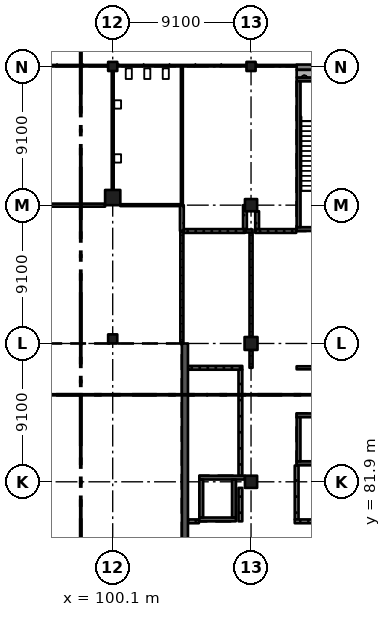
"""IFC4 building model, lengths in metres.
Left out: names, types, materials, properties, quantities, classifications, styles, units other than length and angle.
Written with IfcOpenShell. Run it as: python <this file> out.ifc"""

import sys

from ifc_helpers import new_model, si_unit, direction, frame, frame_2d, origin, origin_2d, place, context, subcontext, project, spatial, rectangle, extrude, element, fill, save


model = new_model("IFC4")
c1 = context("Model", 3, precision=1e-05, world=origin(), true_north=direction((0.0, 1.0)))
c2 = subcontext(c1, "Body", "Model", "MODEL_VIEW")
j1 = project(units=[si_unit("LENGTHUNIT", "METRE"), si_unit("PLANEANGLEUNIT", "RADIAN")], contexts=[c1])
p1 = place(None, origin())
s1 = spatial("IfcSite", under=j1, at=p1, CompositionType="ELEMENT")
p2 = place(p1, origin())
s2 = spatial("IfcBuilding", under=s1, at=p2, CompositionType="ELEMENT")
p3 = place(p2, frame((0.0, 0.0, 6.37)))
s3 = spatial("IfcBuildingStorey", under=s2, at=p3, CompositionType="ELEMENT", Elevation=6.37)
p4 = place(p3, frame((100.1, 91.3, 0.0), z_axis=(0.0, 0.0, 1.0), x_axis=(1.0, 0.0, 0.0)))
e1 = element("IfcColumn", 1, at=p4, inside=s3, PredefinedType="COLUMN", context=c2, shape_type="SweptSolid", body=[
    extrude(rectangle(XDim=0.6, YDim=0.6, at=origin_2d()), origin(), (0.0, 0.0, 1.0), 4.55),
])
p5 = place(p3, frame((100.1, 100.6, 0.0), z_axis=(0.0, 0.0, 1.0), x_axis=(1.0, 0.0, 0.0)))
e2 = element("IfcColumn", 2, at=p5, inside=s3, PredefinedType="COLUMN", context=c2, shape_type="SweptSolid", body=[
    extrude(rectangle(XDim=1.0, YDim=1.0, at=origin_2d()), origin(), (0.0, 0.0, 1.0), 4.55),
])
p6 = place(p3, frame((100.1, 109.225, 0.0), z_axis=(0.0, 0.0, 1.0), x_axis=(1.0, 0.0, 0.0)))
e3 = element("IfcColumn", 3, at=p6, inside=s3, PredefinedType="COLUMN", context=c2, shape_type="SweptSolid", body=[
    extrude(rectangle(XDim=0.6, YDim=0.6, at=origin_2d()), origin(), (0.0, 0.0, 1.0), 4.55),
])
p7 = place(p3, frame((109.2, 81.9, 0.0), z_axis=(0.0, 0.0, 1.0), x_axis=(1.0, 0.0, 0.0)))
e4 = element("IfcColumn", 4, at=p7, inside=s3, PredefinedType="COLUMN", context=c2, shape_type="SweptSolid", body=[
    extrude(rectangle(XDim=0.8, YDim=0.8, at=origin_2d()), origin(), (0.0, 0.0, 1.0), 4.55),
])
p8 = place(p3, frame((109.2, 91.0, 0.0), z_axis=(0.0, 0.0, 1.0), x_axis=(1.0, 0.0, 0.0)))
e5 = element("IfcColumn", 5, at=p8, inside=s3, PredefinedType="COLUMN", context=c2, shape_type="SweptSolid", body=[
    extrude(rectangle(XDim=0.85, YDim=0.85, at=origin_2d()), origin(), (0.0, 0.0, 1.0), 4.55),
])
p9 = place(p3, frame((109.2, 100.1, 0.0), z_axis=(0.0, 0.0, 1.0), x_axis=(1.0, 0.0, 0.0)))
e6 = element("IfcColumn", 6, at=p9, inside=s3, PredefinedType="COLUMN", context=c2, shape_type="SweptSolid", body=[
    extrude(rectangle(XDim=0.8, YDim=0.8, at=origin_2d()), origin(), (0.0, 0.0, 1.0), 4.55),
])
p10 = place(p3, frame((109.2, 109.225, 0.0), z_axis=(0.0, 0.0, 1.0), x_axis=(1.0, 0.0, 0.0)))
e7 = element("IfcColumn", 7, at=p10, inside=s3, PredefinedType="COLUMN", context=c2, shape_type="SweptSolid", body=[
    extrude(rectangle(XDim=0.6, YDim=0.6, at=origin_2d()), origin(), (0.0, 0.0, 1.0), 4.55),
])
p11 = place(p3, frame((104.85, 68.25, 0.0), z_axis=(0.0, 0.0, 1.0), x_axis=(0.0, 1.0, 0.0)))
e8 = element("IfcWall", 8, at=p11, inside=s3, PredefinedType="SHEAR", context=c2, shape_type="SweptSolid", body=[
    extrude(rectangle(XDim=22.75, YDim=0.4, at=frame_2d((11.375, 0.0))), origin(), (0.0, 0.0, 1.0), 4.55),
])
p12 = place(p3, frame((114.8, 83.125, 0.0), z_axis=(0.0, 0.0, 1.0), x_axis=(-1.0, 0.0, 0.0)))
e9 = element("IfcWall", 9, at=p12, inside=s3, PredefinedType="SHEAR", context=c2, shape_type="SweptSolid", body=[
    extrude(rectangle(XDim=2.6, YDim=0.25, at=frame_2d((1.3, 0.0))), origin(), (0.0, 0.0, 1.0), 4.55),
])
p13 = place(p3, frame((114.8, 86.275, 0.0), z_axis=(0.0, 0.0, 1.0), x_axis=(-1.0, 0.0, 0.0)))
e10 = element("IfcWall", 10, at=p13, inside=s3, PredefinedType="SHEAR", context=c2, shape_type="SweptSolid", body=[
    extrude(rectangle(XDim=2.6, YDim=0.25, at=frame_2d((1.3, 0.0))), origin(), (0.0, 0.0, 1.0), 4.55),
])
p14 = place(p13, frame((0.8, 0.0, 0.0)))
e11 = element("IfcOpeningElement", 11, at=p14, cuts=e10, PredefinedType="OPENING", context=c2, shape_type="SweptSolid", body=[
    extrude(rectangle(XDim=1.0, YDim=2.1, at=frame_2d((0.5, 1.05))), frame((0.0, 0.135, 0.0), z_axis=(0.0, -1.0, 0.0), x_axis=(1.0, 0.0, 0.0)), (0.0, 0.0, 1.0), 0.27),
])
p15 = place(p3, frame((112.325, 86.15, 0.0), z_axis=(0.0, 0.0, 1.0), x_axis=(0.0, -1.0, 0.0)))
e12 = element("IfcWall", 12, at=p15, inside=s3, PredefinedType="SHEAR", context=c2, shape_type="SweptSolid", body=[
    extrude(rectangle(XDim=2.9, YDim=0.25, at=frame_2d((1.45, 0.0))), origin(), (0.0, 0.0, 1.0), 4.55),
])
p16 = place(p3, frame((108.2, 79.425, 0.0), z_axis=(0.0, 0.0, 1.0), x_axis=(-1.0, 0.0, 0.0)))
e13 = element("IfcWall", 13, at=p16, inside=s3, PredefinedType="SHEAR", context=c2, shape_type="SweptSolid", body=[
    extrude(rectangle(XDim=2.4, YDim=0.25, at=frame_2d((1.2, 0.0))), origin(), (0.0, 0.0, 1.0), 4.55),
])
p17 = place(p16, frame((0.75, 0.0, 0.0)))
e14 = element("IfcOpeningElement", 14, at=p17, cuts=e13, PredefinedType="OPENING", context=c2, shape_type="SweptSolid", body=[
    extrude(rectangle(XDim=0.9, YDim=2.1, at=frame_2d((0.45, 1.05))), frame((0.0, 0.135, 0.0), z_axis=(0.0, -1.0, 0.0), x_axis=(1.0, 0.0, 0.0)), (0.0, 0.0, 1.0), 0.27),
])
p18 = place(p3, frame((108.8, 82.175, 0.0), z_axis=(0.0, 0.0, 1.0), x_axis=(-1.0, 0.0, 0.0)))
e15 = element("IfcWall", 15, at=p18, inside=s3, PredefinedType="SHEAR", context=c2, shape_type="SweptSolid", body=[
    extrude(rectangle(XDim=3.0, YDim=0.25, at=frame_2d((1.5, 0.0))), origin(), (0.0, 0.0, 1.0), 4.55),
])
for number, where, z_axis, x_axis in (
    (16, (105.925, 82.05, 0.0), (0.0, 0.0, 1.0), (0.0, -1.0, 0.0)),
    (17, (108.075, 82.05, 0.0), (0.0, 0.0, 1.0), (0.0, -1.0, 0.0)),
):
    element("IfcWall", number, at=place(p3, frame(where, z_axis=z_axis, x_axis=x_axis)), inside=s3, PredefinedType="SHEAR", context=c2, shape_type="SweptSolid", body=[
        extrude(rectangle(XDim=2.5, YDim=0.25, at=frame_2d((1.25, 0.0))), origin(), (0.0, 0.0, 1.0), 4.55),
    ])
p19 = place(p3, frame((117.6, 98.525, 0.0), z_axis=(0.0, 0.0, 1.0), x_axis=(-1.0, 0.0, 0.0)))
e18 = element("IfcWall", 18, at=p19, inside=s3, PredefinedType="SHEAR", context=c2, shape_type="SweptSolid", body=[
    extrude(rectangle(XDim=5.4, YDim=0.25, at=frame_2d((2.7, 0.0))), origin(), (0.0, 0.0, 1.0), 4.55),
])
p20 = place(p19, frame((1.5, 0.0, 0.0)))
e19 = element("IfcOpeningElement", 19, at=p20, cuts=e18, PredefinedType="OPENING", context=c2, shape_type="SweptSolid", body=[
    extrude(rectangle(XDim=2.4, YDim=2.1, at=frame_2d((1.2, 1.05))), frame((0.0, 0.135, 0.0), z_axis=(0.0, -1.0, 0.0), x_axis=(1.0, 0.0, 0.0)), (0.0, 0.0, 1.0), 0.27),
])
p21 = place(p3, frame((117.6, 108.375, 0.0), z_axis=(0.0, 0.0, 1.0), x_axis=(-1.0, 0.0, 0.0)))
e20 = element("IfcWall", 20, at=p21, inside=s3, PredefinedType="SHEAR", context=c2, shape_type="SweptSolid", body=[
    extrude(rectangle(XDim=5.4, YDim=0.25, at=frame_2d((2.7, 0.0))), origin(), (0.0, 0.0, 1.0), 4.55),
])
p22 = place(p3, frame((112.325, 108.25, 0.0), z_axis=(0.0, 0.0, 1.0), x_axis=(0.0, -1.0, 0.0)))
e21 = element("IfcWall", 21, at=p22, inside=s3, PredefinedType="SHEAR", context=c2, shape_type="SweptSolid", body=[
    extrude(rectangle(XDim=9.6, YDim=0.25, at=frame_2d((4.8, 0.0))), origin(), (0.0, 0.0, 1.0), 4.55),
])
p23 = place(p3, frame((118.025, 109.175, 0.0), z_axis=(0.0, 0.0, 1.0), x_axis=(-1.0, 0.0, 0.0)))
e22 = element("IfcWall", 22, at=p23, inside=s3, PredefinedType="SOLIDWALL", context=c2, shape_type="SweptSolid", body=[
    extrude(rectangle(XDim=5.825, YDim=0.35, at=frame_2d((2.913, 0.0))), origin(), (0.0, 0.0, 1.0), 3.5),
])
p24 = place(p3, frame((112.2, 108.75, 0.0), z_axis=(0.0, 0.0, 1.0), x_axis=(1.0, 0.0, 0.0)))
e23 = element("IfcWall", 23, at=p24, inside=s3, PredefinedType="SOLIDWALL", context=c2, shape_type="SweptSolid", body=[
    extrude(rectangle(XDim=5.4, YDim=0.5, at=frame_2d((2.7, 0.0))), origin(), (0.0, 0.0, 1.0), 4.55),
])
p25 = place(p3, frame((91.5, 100.1, 0.0), z_axis=(0.0, 0.0, 1.0), x_axis=(1.0, 0.0, 0.0)))
e24 = element("IfcWall", 24, at=p25, inside=s3, PredefinedType="PARTITIONING", context=c2, shape_type="SweptSolid", body=[
    extrude(rectangle(XDim=8.1, YDim=0.2, at=frame_2d((4.05, 0.0))), origin(), (0.0, 0.0, 1.0), 3.55),
])
p26 = place(p25, frame((3.15, 0.0, 0.0)))
e25 = element("IfcOpeningElement", 25, at=p26, cuts=e24, PredefinedType="OPENING", context=c2, shape_type="SweptSolid", body=[
    extrude(rectangle(XDim=1.8, YDim=2.1, at=frame_2d((0.9, 1.05))), frame((0.0, 0.11, 0.0), z_axis=(0.0, -1.0, 0.0), x_axis=(1.0, 0.0, 0.0)), (0.0, 0.0, 1.0), 0.22),
])
p27 = place(p3, frame((100.1, 108.925, 0.0), z_axis=(0.0, 0.0, 1.0), x_axis=(0.0, -1.0, 0.0)))
e26 = element("IfcWall", 26, at=p27, inside=s3, PredefinedType="PARTITIONING", context=c2, shape_type="SweptSolid", body=[
    extrude(rectangle(XDim=7.825, YDim=0.125, at=frame_2d((3.913, 0.0))), origin(), (0.0, 0.0, 1.0), 3.55),
])
p28 = place(p3, frame((100.6, 100.1, 0.0), z_axis=(0.0, 0.0, 1.0), x_axis=(1.0, 0.0, 0.0)))
e27 = element("IfcWall", 27, at=p28, inside=s3, PredefinedType="PARTITIONING", context=c2, shape_type="SweptSolid", body=[
    extrude(rectangle(XDim=3.925, YDim=0.125, at=frame_2d((1.962, 0.0))), origin(), (0.0, 0.0, 1.0), 3.55),
])
p29 = place(p28, frame((1.55, 0.0, 0.0)))
e28 = element("IfcOpeningElement", 28, at=p29, cuts=e27, PredefinedType="OPENING", context=c2, shape_type="SweptSolid", body=[
    extrude(rectangle(XDim=0.9, YDim=2.1, at=frame_2d((0.45, 1.05))), frame((0.0, 0.073, 0.0), z_axis=(0.0, -1.0, 0.0), x_axis=(1.0, 0.0, 0.0)), (0.0, 0.0, 1.0), 0.145),
])
p30 = place(p3, frame((104.65, 91.03, 0.0), z_axis=(0.0, 0.0, 1.0), x_axis=(0.0, 1.0, 0.0)))
e29 = element("IfcWall", 29, at=p30, inside=s3, PredefinedType="PARTITIONING", context=c2, shape_type="SweptSolid", body=[
    extrude(rectangle(XDim=7.37, YDim=0.2, at=frame_2d((3.685, 0.0))), origin(), (0.0, 0.0, 1.0), 4.25),
])
p31 = place(p30, frame((0.95, 0.0, 0.0)))
e30 = element("IfcOpeningElement", 30, at=p31, cuts=e29, PredefinedType="OPENING", context=c2, shape_type="SweptSolid", body=[
    extrude(rectangle(XDim=1.8, YDim=2.4, at=frame_2d((0.9, 1.2))), frame((0.0, 0.11, 0.0), z_axis=(0.0, -1.0, 0.0), x_axis=(1.0, 0.0, 0.0)), (0.0, 0.0, 1.0), 0.22),
])
p32 = place(p30, frame((4.65, 0.0, 0.0)))
e31 = element("IfcOpeningElement", 31, at=p32, cuts=e29, PredefinedType="OPENING", context=c2, shape_type="SweptSolid", body=[
    extrude(rectangle(XDim=1.8, YDim=2.4, at=frame_2d((0.9, 1.2))), frame((0.0, 0.11, 0.0), z_axis=(0.0, -1.0, 0.0), x_axis=(1.0, 0.0, 0.0)), (0.0, 0.0, 1.0), 0.22),
])
p33 = place(p3, frame((104.65, 98.4, 0.0), z_axis=(0.0, 0.0, 1.0), x_axis=(0.0, 1.0, 0.0)))
e32 = element("IfcWall", 32, at=p33, inside=s3, PredefinedType="SOLIDWALL", context=c2, shape_type="SweptSolid", body=[
    extrude(rectangle(XDim=1.7, YDim=0.25, at=frame_2d((0.85, 0.0))), origin(), (0.0, 0.0, 1.0), 4.25),
])
p34 = place(p3, frame((104.65, 100.1, 0.0), z_axis=(0.0, 0.0, 1.0), x_axis=(0.0, 1.0, 0.0)))
e33 = element("IfcWall", 33, at=p34, inside=s3, PredefinedType="PARTITIONING", context=c2, shape_type="SweptSolid", body=[
    extrude(rectangle(XDim=9.07, YDim=0.125, at=frame_2d((4.535, 0.0))), origin(), (0.0, 0.0, 1.0), 4.25),
])
p35 = place(p3, frame((104.775, 98.4, 0.0), z_axis=(0.0, 0.0, 1.0), x_axis=(1.0, 0.0, 0.0)))
e34 = element("IfcWall", 34, at=p35, inside=s3, PredefinedType="SOLIDWALL", context=c2, shape_type="SweptSolid", body=[
    extrude(rectangle(XDim=4.025, YDim=0.25, at=frame_2d((2.013, 0.0))), origin(), (0.0, 0.0, 1.0), 4.25),
])
p36 = place(p35, frame((1.15, 0.0, 0.0)))
e35 = element("IfcOpeningElement", 35, at=p36, cuts=e34, PredefinedType="OPENING", context=c2, shape_type="SweptSolid", body=[
    extrude(rectangle(XDim=1.8, YDim=2.1, at=frame_2d((0.9, 1.05))), frame((0.0, 0.135, 0.0), z_axis=(0.0, -1.0, 0.0), x_axis=(1.0, 0.0, 0.0)), (0.0, 0.0, 1.0), 0.27),
])
p37 = place(p3, frame((105.77, 79.3, 0.0), z_axis=(0.0, 0.0, 1.0), x_axis=(-1.0, 0.0, 0.0)))
e36 = element("IfcWall", 36, at=p37, inside=s3, PredefinedType="SOLIDWALL", context=c2, shape_type="SweptSolid", body=[
    extrude(rectangle(XDim=0.72, YDim=0.25, at=frame_2d((0.36, 0.0))), origin(), (0.0, 0.0, 1.0), 4.25),
])
p38 = place(p3, frame((108.5, 79.3, 0.0), z_axis=(0.0, 0.0, 1.0), x_axis=(0.0, 1.0, 0.0)))
e37 = element("IfcWall", 37, at=p38, inside=s3, PredefinedType="SOLIDWALL", context=c2, shape_type="SweptSolid", body=[
    extrude(rectangle(XDim=2.2, YDim=0.25, at=frame_2d((1.1, 0.0))), origin(), (0.0, 0.0, 1.0), 4.25),
])
p39 = place(p3, frame((108.5, 82.3, 0.0), z_axis=(0.0, 0.0, 1.0), x_axis=(0.0, 1.0, 0.0)))
e38 = element("IfcWall", 38, at=p39, inside=s3, PredefinedType="SOLIDWALL", context=c2, shape_type="SweptSolid", body=[
    extrude(rectangle(XDim=6.975, YDim=0.25, at=frame_2d((3.487, 0.0))), origin(), (0.0, 0.0, 1.0), 4.25),
])
p40 = place(p3, frame((108.625, 89.4, 0.0), z_axis=(0.0, 0.0, 1.0), x_axis=(-1.0, 0.0, 0.0)))
e39 = element("IfcWall", 39, at=p40, inside=s3, PredefinedType="SOLIDWALL", context=c2, shape_type="SweptSolid", body=[
    extrude(rectangle(XDim=3.575, YDim=0.25, at=frame_2d((1.788, 0.0))), origin(), (0.0, 0.0, 1.0), 4.25),
])
p41 = place(p40, frame((1.25, 0.0, 0.0)))
e40 = element("IfcOpeningElement", 40, at=p41, cuts=e39, PredefinedType="OPENING", context=c2, shape_type="SweptSolid", body=[
    extrude(rectangle(XDim=1.0, YDim=2.1, at=frame_2d((0.5, 1.05))), frame((0.0, 0.135, 0.0), z_axis=(0.0, -1.0, 0.0), x_axis=(1.0, 0.0, 0.0)), (0.0, 0.0, 1.0), 0.27),
])
p42 = place(p3, frame((108.8, 98.525, 0.0), z_axis=(0.0, 0.0, 1.0), x_axis=(0.0, 1.0, 0.0)))
e41 = element("IfcWall", 41, at=p42, inside=s3, PredefinedType="SOLIDWALL", context=c2, shape_type="SweptSolid", body=[
    extrude(rectangle(XDim=1.575, YDim=0.25, at=frame_2d((0.788, 0.0))), origin(), (0.0, 0.0, 1.0), 4.25),
])
p43 = place(p3, frame((109.2, 89.4, 0.0), z_axis=(0.0, 0.0, 1.0), x_axis=(0.0, 1.0, 0.0)))
e42 = element("IfcWall", 42, at=p43, inside=s3, PredefinedType="PARTITIONING", context=c2, shape_type="SweptSolid", body=[
    extrude(rectangle(XDim=1.175, YDim=0.2, at=frame_2d((0.587, 0.0))), origin(), (0.0, 0.0, 1.0), 3.55),
])
p44 = place(p3, frame((109.2, 91.425, 0.0), z_axis=(0.0, 0.0, 1.0), x_axis=(0.0, 1.0, 0.0)))
e43 = element("IfcWall", 43, at=p44, inside=s3, PredefinedType="PARTITIONING", context=c2, shape_type="SweptSolid", body=[
    extrude(rectangle(XDim=6.875, YDim=0.2, at=frame_2d((3.438, 0.0))), origin(), (0.0, 0.0, 1.0), 3.55),
])
p45 = place(p44, frame((0.85, 0.0, 0.0)))
e44 = element("IfcOpeningElement", 44, at=p45, cuts=e43, PredefinedType="OPENING", context=c2, shape_type="SweptSolid", body=[
    extrude(rectangle(XDim=1.8, YDim=2.4, at=frame_2d((0.9, 1.2))), frame((0.0, 0.11, 0.0), z_axis=(0.0, -1.0, 0.0), x_axis=(1.0, 0.0, 0.0)), (0.0, 0.0, 1.0), 0.22),
])
p46 = place(p44, frame((4.25, 0.0, 0.0)))
e45 = element("IfcOpeningElement", 45, at=p46, cuts=e43, PredefinedType="OPENING", context=c2, shape_type="SweptSolid", body=[
    extrude(rectangle(XDim=1.8, YDim=2.4, at=frame_2d((0.9, 1.2))), frame((0.0, 0.11, 0.0), z_axis=(0.0, -1.0, 0.0), x_axis=(1.0, 0.0, 0.0)), (0.0, 0.0, 1.0), 0.22),
])
p47 = place(p3, frame((109.3, 98.4, 0.0), z_axis=(0.0, 0.0, 1.0), x_axis=(-1.0, 0.0, 0.0)))
e46 = element("IfcWall", 46, at=p47, inside=s3, PredefinedType="PARTITIONING", context=c2, shape_type="SweptSolid", body=[
    extrude(rectangle(XDim=0.5, YDim=0.2, at=frame_2d((0.25, 0.0))), origin(), (0.0, 0.0, 1.0), 4.25),
])
p48 = place(p3, frame((109.475, 98.4, 0.0), z_axis=(0.0, 0.0, 1.0), x_axis=(1.0, 0.0, 0.0)))
e47 = element("IfcWall", 47, at=p48, inside=s3, PredefinedType="SOLIDWALL", context=c2, shape_type="SweptSolid", body=[
    extrude(rectangle(XDim=2.695, YDim=0.25, at=frame_2d((1.347, 0.0))), origin(), (0.0, 0.0, 1.0), 4.25),
])
p49 = place(p3, frame((109.6, 99.7, 0.0), z_axis=(0.0, 0.0, 1.0), x_axis=(0.0, -1.0, 0.0)))
e48 = element("IfcWall", 48, at=p49, inside=s3, PredefinedType="SOLIDWALL", context=c2, shape_type="SweptSolid", body=[
    extrude(rectangle(XDim=1.175, YDim=0.25, at=frame_2d((0.587, 0.0))), origin(), (0.0, 0.0, 1.0), 4.25),
])
p50 = place(p3, frame((112.2, 79.425, 0.0), z_axis=(0.0, 0.0, 1.0), x_axis=(0.0, 1.0, 0.0)))
e49 = element("IfcWall", 49, at=p50, inside=s3, PredefinedType="SOLIDWALL", context=c2, shape_type="SweptSolid", body=[
    extrude(rectangle(XDim=3.545, YDim=0.25, at=frame_2d((1.772, 0.0))), origin(), (0.0, 0.0, 1.0), 4.25),
])
p51 = place(p3, frame((112.075, 79.3, 0.0), z_axis=(0.0, 0.0, 1.0), x_axis=(1.0, 0.0, 0.0)))
e50 = element("IfcWall", 50, at=p51, inside=s3, PredefinedType="SOLIDWALL", context=c2, shape_type="SweptSolid", body=[
    extrude(rectangle(XDim=6.795, YDim=0.25, at=frame_2d((3.397, 0.0))), origin(), (0.0, 0.0, 1.0), 4.25),
])
p52 = place(p3, frame((117.5, 89.4, 0.0), z_axis=(0.0, 0.0, 1.0), x_axis=(-1.0, 0.0, 0.0)))
e51 = element("IfcWall", 51, at=p52, inside=s3, PredefinedType="PARTITIONING", context=c2, shape_type="SweptSolid", body=[
    extrude(rectangle(XDim=5.3, YDim=0.2, at=frame_2d((2.65, 0.0))), origin(), (0.0, 0.0, 1.0), 4.25),
])
p53 = place(p52, frame((1.75, 0.0, 0.0)))
e52 = element("IfcOpeningElement", 52, at=p53, cuts=e51, PredefinedType="OPENING", context=c2, shape_type="SweptSolid", body=[
    extrude(rectangle(XDim=1.8, YDim=2.4, at=frame_2d((0.9, 1.2))), frame((0.0, 0.11, 0.0), z_axis=(0.0, -1.0, 0.0), x_axis=(1.0, 0.0, 0.0)), (0.0, 0.0, 1.0), 0.22),
])
p54 = place(p41, origin())
e53 = element("IfcDoor", 53, at=p54, inside=s3, OperationType="SINGLE_SWING_RIGHT", PredefinedType="DOOR", context=c2, shape_type="SweptSolid", body=[
    extrude(rectangle(XDim=1.0, YDim=2.1, at=frame_2d((0.5, 1.05))), frame((0.0, 0.025, 0.0), z_axis=(0.0, -1.0, 0.0), x_axis=(1.0, 0.0, 0.0)), (0.0, 0.0, 1.0), 0.05),
])
fill(e40, e53)
p55 = place(p36, origin())
e54 = element("IfcDoor", 54, at=p55, inside=s3, OperationType="DOUBLE_DOOR_SINGLE_SWING", PredefinedType="DOOR", context=c2, shape_type="SweptSolid", body=[
    extrude(rectangle(XDim=1.8, YDim=2.1, at=frame_2d((0.9, 1.05))), frame((0.0, 0.025, 0.0), z_axis=(0.0, -1.0, 0.0), x_axis=(1.0, 0.0, 0.0)), (0.0, 0.0, 1.0), 0.05),
])
fill(e35, e54)
p56 = place(p26, origin())
e55 = element("IfcDoor", 55, at=p56, inside=s3, OperationType="DOUBLE_DOOR_SINGLE_SWING", PredefinedType="DOOR", context=c2, shape_type="SweptSolid", body=[
    extrude(rectangle(XDim=1.8, YDim=2.1, at=frame_2d((0.9, 1.05))), frame((0.0, 0.025, 0.0), z_axis=(0.0, -1.0, 0.0), x_axis=(1.0, 0.0, 0.0)), (0.0, 0.0, 1.0), 0.05),
])
fill(e25, e55)
p57 = place(p29, origin())
e56 = element("IfcDoor", 56, at=p57, inside=s3, OperationType="SINGLE_SWING_LEFT", PredefinedType="DOOR", context=c2, shape_type="SweptSolid", body=[
    extrude(rectangle(XDim=0.9, YDim=2.1, at=frame_2d((0.45, 1.05))), frame((0.0, 0.025, 0.0), z_axis=(0.0, -1.0, 0.0), x_axis=(1.0, 0.0, 0.0)), (0.0, 0.0, 1.0), 0.05),
])
fill(e28, e56)
p58 = place(p45, origin())
e57 = element("IfcDoor", 57, at=p58, inside=s3, OperationType="DOUBLE_DOOR_SINGLE_SWING", PredefinedType="DOOR", context=c2, shape_type="SweptSolid", body=[
    extrude(rectangle(XDim=1.8, YDim=2.4, at=frame_2d((0.9, 1.2))), frame((0.0, 0.025, 0.0), z_axis=(0.0, -1.0, 0.0), x_axis=(1.0, 0.0, 0.0)), (0.0, 0.0, 1.0), 0.05),
])
fill(e44, e57)
p59 = place(p46, origin())
e58 = element("IfcDoor", 58, at=p59, inside=s3, OperationType="DOUBLE_DOOR_SINGLE_SWING", PredefinedType="DOOR", context=c2, shape_type="SweptSolid", body=[
    extrude(rectangle(XDim=1.8, YDim=2.4, at=frame_2d((0.9, 1.2))), frame((0.0, 0.025, 0.0), z_axis=(0.0, -1.0, 0.0), x_axis=(1.0, 0.0, 0.0)), (0.0, 0.0, 1.0), 0.05),
])
fill(e45, e58)
p60 = place(p31, origin())
e59 = element("IfcDoor", 59, at=p60, inside=s3, OperationType="DOUBLE_DOOR_SINGLE_SWING", PredefinedType="DOOR", context=c2, shape_type="SweptSolid", body=[
    extrude(rectangle(XDim=1.8, YDim=2.4, at=frame_2d((0.9, 1.2))), frame((0.0, 0.025, 0.0), z_axis=(0.0, -1.0, 0.0), x_axis=(1.0, 0.0, 0.0)), (0.0, 0.0, 1.0), 0.05),
])
fill(e30, e59)
p61 = place(p32, origin())
e60 = element("IfcDoor", 60, at=p61, inside=s3, OperationType="DOUBLE_DOOR_SINGLE_SWING", PredefinedType="DOOR", context=c2, shape_type="SweptSolid", body=[
    extrude(rectangle(XDim=1.8, YDim=2.4, at=frame_2d((0.9, 1.2))), frame((0.0, 0.025, 0.0), z_axis=(0.0, -1.0, 0.0), x_axis=(1.0, 0.0, 0.0)), (0.0, 0.0, 1.0), 0.05),
])
fill(e31, e60)
p62 = place(p17, origin())
e61 = element("IfcDoor", 61, at=p62, inside=s3, OperationType="SINGLE_SWING_LEFT", PredefinedType="DOOR", context=c2, shape_type="SweptSolid", body=[
    extrude(rectangle(XDim=0.9, YDim=2.1, at=frame_2d((0.45, 1.05))), frame((0.0, 0.025, 0.0), z_axis=(0.0, -1.0, 0.0), x_axis=(1.0, 0.0, 0.0)), (0.0, 0.0, 1.0), 0.05),
])
fill(e14, e61)
p63 = place(p14, origin())
e62 = element("IfcDoor", 62, at=p63, inside=s3, OperationType="DOUBLE_DOOR_SLIDING", PredefinedType="DOOR", context=c2, shape_type="SweptSolid", body=[
    extrude(rectangle(XDim=1.0, YDim=2.1, at=frame_2d((0.5, 1.05))), frame((0.0, 0.025, 0.0), z_axis=(0.0, -1.0, 0.0), x_axis=(1.0, 0.0, 0.0)), (0.0, 0.0, 1.0), 0.05),
])
fill(e11, e62)
save(model, sys.argv[1])
